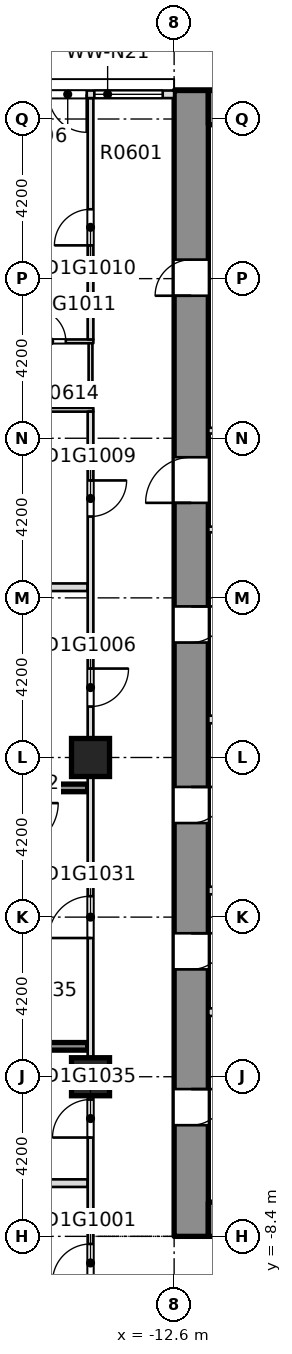
"""IFC4 building model, lengths in metres.
Left out: names, types, materials, properties, quantities, classifications, styles, units other than length and angle.
Written with IfcOpenShell. Run it as: python <this file> out.ifc"""

import sys

from ifc_helpers import new_model, si_unit, direction, frame, frame_2d, origin, origin_2d, place, context, subcontext, project, spatial, rectangle, extrude, element, fill, save


model = new_model("IFC4")
c1 = context("Model", 3, precision=1e-05, world=origin(), true_north=direction((0.0, 1.0)))
c2 = subcontext(c1, "Body", "Model", "MODEL_VIEW")
j1 = project(units=[si_unit("LENGTHUNIT", "METRE"), si_unit("PLANEANGLEUNIT", "RADIAN")], contexts=[c1])
p1 = place(None, origin())
s1 = spatial("IfcSite", under=j1, at=p1, CompositionType="ELEMENT")
p2 = place(p1, origin())
s2 = spatial("IfcBuilding", under=s1, at=p2, CompositionType="ELEMENT")
p3 = place(p2, frame((0.0, 0.0, 34.5)))
s3 = spatial("IfcBuildingStorey", under=s2, at=p3, CompositionType="ELEMENT", Elevation=34.5)
p4 = place(p3, frame((-12.15, -8.4, -0.32), z_axis=(0.0, 0.0, 1.0), x_axis=(0.0, 1.0, 0.0)))
e1 = element("IfcWall", 1, at=p4, inside=s3, PredefinedType="SHEAR", context=c2, shape_type="SweptSolid", body=[
    extrude(rectangle(XDim=30.15, YDim=0.9, at=frame_2d((15.075, 0.0))), origin(), (0.0, 0.0, 1.0), 3.45),
])
p5 = place(p4, frame((2.925, 0.0, 0.32)))
e2 = element("IfcOpeningElement", 2, at=p5, cuts=e1, PredefinedType="OPENING", context=c2, shape_type="SweptSolid", body=[
    extrude(rectangle(XDim=0.95, YDim=2.1, at=frame_2d((0.475, 1.05))), frame((0.0, 0.46, 0.0), z_axis=(0.0, -1.0, 0.0), x_axis=(1.0, 0.0, 0.0)), (0.0, 0.0, 1.0), 0.92),
])
p6 = place(p4, frame((7.025, 0.0, 0.32)))
e3 = element("IfcOpeningElement", 3, at=p6, cuts=e1, PredefinedType="OPENING", context=c2, shape_type="SweptSolid", body=[
    extrude(rectangle(XDim=0.95, YDim=2.1, at=frame_2d((0.475, 1.05))), frame((0.0, 0.46, 0.0), z_axis=(0.0, -1.0, 0.0), x_axis=(1.0, 0.0, 0.0)), (0.0, 0.0, 1.0), 0.92),
])
p7 = place(p4, frame((10.875, 0.0, 0.32)))
e4 = element("IfcOpeningElement", 4, at=p7, cuts=e1, PredefinedType="OPENING", context=c2, shape_type="SweptSolid", body=[
    extrude(rectangle(XDim=0.95, YDim=2.1, at=frame_2d((0.475, 1.05))), frame((0.0, 0.46, 0.0), z_axis=(0.0, -1.0, 0.0), x_axis=(1.0, 0.0, 0.0)), (0.0, 0.0, 1.0), 0.92),
])
p8 = place(p4, frame((15.625, 0.0, 0.32)))
e5 = element("IfcOpeningElement", 5, at=p8, cuts=e1, PredefinedType="OPENING", context=c2, shape_type="SweptSolid", body=[
    extrude(rectangle(XDim=0.95, YDim=2.1, at=frame_2d((0.475, 1.05))), frame((0.0, 0.46, 0.0), z_axis=(0.0, -1.0, 0.0), x_axis=(1.0, 0.0, 0.0)), (0.0, 0.0, 1.0), 0.92),
])
p9 = place(p4, frame((24.75, 0.0, 0.32)))
e6 = element("IfcOpeningElement", 6, at=p9, cuts=e1, PredefinedType="OPENING", context=c2, shape_type="SweptSolid", body=[
    extrude(rectangle(XDim=0.95, YDim=2.1, at=frame_2d((0.475, 1.05))), frame((0.0, 0.46, 0.0), z_axis=(0.0, -1.0, 0.0), x_axis=(1.0, 0.0, 0.0)), (0.0, 0.0, 1.0), 0.92),
])
p10 = place(p4, frame((19.3, 0.0, 0.32)))
e7 = element("IfcOpeningElement", 7, at=p10, cuts=e1, PredefinedType="OPENING", context=c2, shape_type="SweptSolid", body=[
    extrude(rectangle(XDim=1.2, YDim=2.1, at=frame_2d((0.6, 1.05))), frame((0.0, 0.46, 0.0), z_axis=(0.0, -1.0, 0.0), x_axis=(1.0, 0.0, 0.0)), (0.0, 0.0, 1.0), 0.92),
])
p11 = place(p3, frame((-11.7, -7.95, -0.32), z_axis=(0.0, 0.0, 1.0), x_axis=(1.0, 0.0, 0.0)))
e8 = element("IfcWall", 8, at=p11, inside=s3, PredefinedType="SHEAR", context=c2, shape_type="SweptSolid", body=[
    extrude(rectangle(XDim=23.4, YDim=0.9, at=frame_2d((11.7, 0.0))), origin(), (0.0, 0.0, 1.0), 3.45),
])
p12 = place(p11, frame((6.95, 0.0, 0.32)))
e9 = element("IfcOpeningElement", 9, at=p12, cuts=e8, PredefinedType="OPENING", context=c2, shape_type="SweptSolid", body=[
    extrude(rectangle(XDim=1.8, YDim=2.1, at=frame_2d((0.9, 1.05))), frame((0.0, 0.46, 0.0), z_axis=(0.0, -1.0, 0.0), x_axis=(1.0, 0.0, 0.0)), (0.0, 0.0, 1.0), 0.92),
])
p13 = place(p11, frame((14.65, 0.0, 0.32)))
e10 = element("IfcOpeningElement", 10, at=p13, cuts=e8, PredefinedType="OPENING", context=c2, shape_type="SweptSolid", body=[
    extrude(rectangle(XDim=1.8, YDim=2.1, at=frame_2d((0.9, 1.05))), frame((0.0, 0.46, 0.0), z_axis=(0.0, -1.0, 0.0), x_axis=(1.0, 0.0, 0.0)), (0.0, 0.0, 1.0), 0.92),
])
p14 = place(p3, frame((-11.7, 21.3, -0.32), z_axis=(0.0, 0.0, 1.0), x_axis=(1.0, 0.0, 0.0)))
e11 = element("IfcWall", 11, at=p14, inside=s3, PredefinedType="SOLIDWALL", context=c2, shape_type="SweptSolid", body=[
    extrude(rectangle(XDim=23.4, YDim=0.9, at=frame_2d((11.7, 0.0))), origin(), (0.0, 0.0, 1.0), 3.45),
])
for number, where, z_axis, x_axis in (
    (12, (-14.8, -4.2, -0.32), (0.0, 0.0, 1.0), (1.0, 0.0, 0.0)),
    (13, (-14.8, 4.2, -0.32), (0.0, 0.0, 1.0), (1.0, 0.0, 0.0)),
):
    element("IfcColumn", number, at=place(p3, frame(where, z_axis=z_axis, x_axis=x_axis)), inside=s3, PredefinedType="COLUMN", context=c2, shape_type="SweptSolid", body=[
        extrude(rectangle(XDim=1.0, YDim=1.0, at=origin_2d()), origin(), (0.0, 0.0, 1.0), 3.45),
    ])
p15 = place(p3, frame((-25.75, -7.0, 0.0), z_axis=(0.0, 0.0, 1.0), x_axis=(1.0, 0.0, 0.0)))
e14 = element("IfcWall", 14, at=p15, inside=s3, PredefinedType="PARTITIONING", context=c2, shape_type="SweptSolid", body=[
    extrude(rectangle(XDim=10.875, YDim=0.2, at=frame_2d((5.438, 0.0))), origin(), (0.0, 0.0, 1.0), 3.13),
])
p16 = place(p3, frame((-23.0, -3.4, 0.0), z_axis=(0.0, 0.0, 1.0), x_axis=(1.0, 0.0, 0.0)))
e15 = element("IfcWall", 15, at=p16, inside=s3, PredefinedType="SOLIDWALL", context=c2, shape_type="SweptSolid", body=[
    extrude(rectangle(XDim=8.125, YDim=0.2, at=frame_2d((4.062, 0.0))), origin(), (0.0, 0.0, 1.0), 3.13),
])
p17 = place(p3, frame((-20.45, 3.4, 0.0), z_axis=(0.0, 0.0, 1.0), x_axis=(1.0, 0.0, 0.0)))
e16 = element("IfcWall", 16, at=p17, inside=s3, PredefinedType="SOLIDWALL", context=c2, shape_type="SweptSolid", body=[
    extrude(rectangle(XDim=5.575, YDim=0.2, at=frame_2d((2.788, 0.0))), origin(), (0.0, 0.0, 1.0), 3.13),
])
p18 = place(p3, frame((-25.75, 8.68, 0.0), z_axis=(0.0, 0.0, 1.0), x_axis=(1.0, 0.0, 0.0)))
e17 = element("IfcWall", 17, at=p18, inside=s3, PredefinedType="PARTITIONING", context=c2, shape_type="SweptSolid", body=[
    extrude(rectangle(XDim=10.875, YDim=0.2, at=frame_2d((5.438, 0.0))), origin(), (0.0, 0.0, 1.0), 3.13),
])
p19 = place(p3, frame((-17.25, 13.35, 0.0), z_axis=(0.0, 0.0, 1.0), x_axis=(1.0, 0.0, 0.0)))
e18 = element("IfcWall", 18, at=p19, inside=s3, PredefinedType="PARTITIONING", context=c2, shape_type="SweptSolid", body=[
    extrude(rectangle(XDim=2.525, YDim=0.1, at=frame_2d((1.262, 0.0))), origin(), (0.0, 0.0, 1.0), 3.13),
])
p20 = place(p3, frame((-16.45, 15.15, 0.0), z_axis=(0.0, 0.0, 1.0), x_axis=(1.0, 0.0, 0.0)))
e19 = element("IfcWall", 19, at=p20, inside=s3, PredefinedType="PARTITIONING", context=c2, shape_type="SweptSolid", body=[
    extrude(rectangle(XDim=1.725, YDim=0.1, at=frame_2d((0.862, 0.0))), origin(), (0.0, 0.0, 1.0), 3.13),
])
p21 = place(p20, frame((0.15, 0.0, 0.0)))
e20 = element("IfcOpeningElement", 20, at=p21, cuts=e19, PredefinedType="OPENING", context=c2, shape_type="SweptSolid", body=[
    extrude(rectangle(XDim=0.85, YDim=2.1, at=frame_2d((0.425, 1.05))), frame((0.0, 0.06, 0.0), z_axis=(0.0, -1.0, 0.0), x_axis=(1.0, 0.0, 0.0)), (0.0, 0.0, 1.0), 0.12),
])
p22 = place(p3, frame((-14.8, -10.525, 0.0), z_axis=(0.0, 0.0, 1.0), x_axis=(0.0, 1.0, 0.0)))
e21 = element("IfcWall", 21, at=p22, inside=s3, PredefinedType="PARTITIONING", context=c2, shape_type="SweptSolid", body=[
    extrude(rectangle(XDim=23.825, YDim=0.15, at=frame_2d((11.913, 0.0))), origin(), (0.0, 0.0, 1.0), 3.13),
])
p23 = place(p22, frame((0.925, 0.0, 0.0)))
e22 = element("IfcOpeningElement", 22, at=p23, cuts=e21, PredefinedType="OPENING", context=c2, shape_type="SweptSolid", body=[
    extrude(rectangle(XDim=1.0, YDim=2.1, at=frame_2d((0.5, 1.05))), frame((0.0, 0.085, 0.0), z_axis=(0.0, -1.0, 0.0), x_axis=(1.0, 0.0, 0.0)), (0.0, 0.0, 1.0), 0.17),
])
p24 = place(p22, frame((16.065, 0.0, 0.0)))
e23 = element("IfcOpeningElement", 23, at=p24, cuts=e21, PredefinedType="OPENING", context=c2, shape_type="SweptSolid", body=[
    extrude(rectangle(XDim=1.0, YDim=2.1, at=frame_2d((0.5, 1.05))), frame((0.0, 0.085, 0.0), z_axis=(0.0, -1.0, 0.0), x_axis=(1.0, 0.0, 0.0)), (0.0, 0.0, 1.0), 0.17),
])
p25 = place(p22, frame((21.065, 0.0, 0.0)))
e24 = element("IfcOpeningElement", 24, at=p25, cuts=e21, PredefinedType="OPENING", context=c2, shape_type="SweptSolid", body=[
    extrude(rectangle(XDim=0.95, YDim=2.1, at=frame_2d((0.475, 1.05))), frame((0.0, 0.085, 0.0), z_axis=(0.0, -1.0, 0.0), x_axis=(1.0, 0.0, 0.0)), (0.0, 0.0, 1.0), 0.17),
])
p26 = place(p22, frame((9.975, 0.0, 0.0)))
e25 = element("IfcOpeningElement", 25, at=p26, cuts=e21, PredefinedType="OPENING", context=c2, shape_type="SweptSolid", body=[
    extrude(rectangle(XDim=1.1, YDim=2.1, at=frame_2d((0.55, 1.05))), frame((0.0, 0.085, 0.0), z_axis=(0.0, -1.0, 0.0), x_axis=(1.0, 0.0, 0.0)), (0.0, 0.0, 1.0), 0.17),
])
p27 = place(p22, frame((4.725, 0.0, 0.0)))
e26 = element("IfcOpeningElement", 26, at=p27, cuts=e21, PredefinedType="OPENING", context=c2, shape_type="SweptSolid", body=[
    extrude(rectangle(XDim=1.0, YDim=2.1, at=frame_2d((0.5, 1.05))), frame((0.0, 0.085, 0.0), z_axis=(0.0, -1.0, 0.0), x_axis=(1.0, 0.0, 0.0)), (0.0, 0.0, 1.0), 0.17),
])
p28 = place(p3, frame((-14.8, 13.4, 0.0), z_axis=(0.0, 0.0, 1.0), x_axis=(0.0, 1.0, 0.0)))
e27 = element("IfcWall", 27, at=p28, inside=s3, PredefinedType="PARTITIONING", context=c2, shape_type="SweptSolid", body=[
    extrude(rectangle(XDim=1.7, YDim=0.1, at=frame_2d((0.85, 0.0))), origin(), (0.0, 0.0, 1.0), 3.13),
])
p29 = place(p3, frame((-14.8, 15.2, 0.0), z_axis=(0.0, 0.0, 1.0), x_axis=(0.0, 1.0, 0.0)))
e28 = element("IfcWall", 28, at=p29, inside=s3, PredefinedType="PARTITIONING", context=c2, shape_type="SweptSolid", body=[
    extrude(rectangle(XDim=6.35, YDim=0.15, at=frame_2d((3.175, 0.0))), origin(), (0.0, 0.0, 1.0), 3.13),
])
p30 = place(p29, frame((2.475, 0.0, 0.0)))
e29 = element("IfcOpeningElement", 29, at=p30, cuts=e28, PredefinedType="OPENING", context=c2, shape_type="SweptSolid", body=[
    extrude(rectangle(XDim=0.95, YDim=2.1, at=frame_2d((0.475, 1.05))), frame((0.0, 0.085, 0.0), z_axis=(0.0, -1.0, 0.0), x_axis=(1.0, 0.0, 0.0)), (0.0, 0.0, 1.0), 0.17),
])
p31 = place(p3, frame((-12.6, 21.65, 0.0), z_axis=(0.0, 0.0, 1.0), x_axis=(-1.0, 0.0, 0.0)))
e30 = element("IfcWall", 30, at=p31, inside=s3, PredefinedType="STANDARD", context=c2, shape_type="SweptSolid", body=[
    extrude(rectangle(XDim=3.5, YDim=0.2, at=frame_2d((1.75, 0.0))), origin(), (0.0, 0.0, 1.0), 3.13),
])
p32 = place(p31, frame((0.3, 0.0, 0.2)))
e31 = element("IfcOpeningElement", 31, at=p32, cuts=e30, PredefinedType="OPENING", context=c2, shape_type="SweptSolid", body=[
    extrude(rectangle(XDim=1.8, YDim=2.65, at=frame_2d((0.9, 1.325))), frame((0.0, 0.11, 0.0), z_axis=(0.0, -1.0, 0.0), x_axis=(1.0, 0.0, 0.0)), (0.0, 0.0, 1.0), 0.22),
])
p33 = place(p31, frame((2.3, 0.0, 0.0)))
e32 = element("IfcOpeningElement", 32, at=p33, cuts=e30, PredefinedType="OPENING", context=c2, shape_type="SweptSolid", body=[
    extrude(rectangle(XDim=1.0, YDim=2.4, at=frame_2d((0.5, 1.2))), frame((0.0, 0.11, 0.0), z_axis=(0.0, -1.0, 0.0), x_axis=(1.0, 0.0, 0.0)), (0.0, 0.0, 1.0), 0.22),
])
for number, where, z_axis, x_axis in (
    (33, (-11.699, -2.5, 0.0), (0.0, 0.0, 1.0), (1.0, 0.0, 0.0)),
    (34, (-11.699, 0.7, 0.0), (0.0, 0.0, 1.0), (1.0, 0.0, 0.0)),
    (35, (-11.699, 5.2, 0.0), (0.0, 0.0, 1.0), (1.0, 0.0, 0.0)),
):
    element("IfcWall", number, at=place(p3, frame(where, z_axis=z_axis, x_axis=x_axis)), inside=s3, PredefinedType="PARTITIONING", context=c2, shape_type="SweptSolid", body=[
        extrude(rectangle(XDim=2.848, YDim=0.2, at=frame_2d((1.424, 0.0))), origin(), (0.0, 0.0, 1.0), 3.13),
    ])
for number, where, z_axis, x_axis in (
    (36, (-11.699, 10.2, 0.0), (0.0, 0.0, 1.0), (1.0, 0.0, 0.0)),
    (37, (-11.699, 12.8, 0.0), (0.0, 0.0, 1.0), (1.0, 0.0, 0.0)),
):
    element("IfcWall", number, at=place(p3, frame(where, z_axis=z_axis, x_axis=x_axis)), inside=s3, PredefinedType="PARTITIONING", context=c2, shape_type="SweptSolid", body=[
        extrude(rectangle(XDim=2.848, YDim=0.15, at=frame_2d((1.424, 0.0))), origin(), (0.0, 0.0, 1.0), 3.13),
    ])
p34 = place(p23, origin())
e38 = element("IfcDoor", 38, at=p34, inside=s3, OperationType="SINGLE_SWING_LEFT", PredefinedType="DOOR", context=c2, shape_type="SweptSolid", body=[
    extrude(rectangle(XDim=1.0, YDim=2.1, at=frame_2d((0.5, 1.05))), frame((0.0, 0.025, 0.0), z_axis=(0.0, -1.0, 0.0), x_axis=(1.0, 0.0, 0.0)), (0.0, 0.0, 1.0), 0.05),
])
fill(e22, e38)
p35 = place(p24, origin())
e39 = element("IfcDoor", 39, at=p35, inside=s3, OperationType="SINGLE_SWING_LEFT", PredefinedType="DOOR", context=c2, shape_type="SweptSolid", body=[
    extrude(rectangle(XDim=1.0, YDim=2.1, at=frame_2d((0.5, 1.05))), frame((0.0, 0.025, 0.0), z_axis=(0.0, -1.0, 0.0), x_axis=(1.0, 0.0, 0.0)), (0.0, 0.0, 1.0), 0.05),
])
fill(e23, e39)
p36 = place(p25, origin())
e40 = element("IfcDoor", 40, at=p36, inside=s3, OperationType="SINGLE_SWING_RIGHT", PredefinedType="DOOR", context=c2, shape_type="SweptSolid", body=[
    extrude(rectangle(XDim=0.95, YDim=2.1, at=frame_2d((0.475, 1.05))), frame((0.0, 0.025, 0.0), z_axis=(0.0, -1.0, 0.0), x_axis=(1.0, 0.0, 0.0)), (0.0, 0.0, 1.0), 0.05),
])
fill(e24, e40)
p37 = place(p30, origin())
e41 = element("IfcDoor", 41, at=p37, inside=s3, OperationType="SINGLE_SWING_RIGHT", PredefinedType="DOOR", context=c2, shape_type="SweptSolid", body=[
    extrude(rectangle(XDim=0.95, YDim=2.1, at=frame_2d((0.475, 1.05))), frame((0.0, 0.025, 0.0), z_axis=(0.0, -1.0, 0.0), x_axis=(1.0, 0.0, 0.0)), (0.0, 0.0, 1.0), 0.05),
])
fill(e29, e41)
p38 = place(p21, origin())
e42 = element("IfcDoor", 42, at=p38, inside=s3, OperationType="SINGLE_SWING_RIGHT", PredefinedType="DOOR", context=c2, shape_type="SweptSolid", body=[
    extrude(rectangle(XDim=0.85, YDim=2.1, at=frame_2d((0.425, 1.05))), frame((0.0, 0.025, 0.0), z_axis=(0.0, -1.0, 0.0), x_axis=(1.0, 0.0, 0.0)), (0.0, 0.0, 1.0), 0.05),
])
fill(e20, e42)
p39 = place(p26, origin())
e43 = element("IfcDoor", 43, at=p39, inside=s3, OperationType="SINGLE_SWING_RIGHT", PredefinedType="DOOR", context=c2, shape_type="SweptSolid", body=[
    extrude(rectangle(XDim=1.1, YDim=2.1, at=frame_2d((0.55, 1.05))), frame((0.0, 0.025, 0.0), z_axis=(0.0, -1.0, 0.0), x_axis=(1.0, 0.0, 0.0)), (0.0, 0.0, 1.0), 0.05),
])
fill(e25, e43)
p40 = place(p27, origin())
e44 = element("IfcDoor", 44, at=p40, inside=s3, OperationType="SINGLE_SWING_LEFT", PredefinedType="DOOR", context=c2, shape_type="SweptSolid", body=[
    extrude(rectangle(XDim=1.0, YDim=2.1, at=frame_2d((0.5, 1.05))), frame((0.0, 0.025, 0.0), z_axis=(0.0, -1.0, 0.0), x_axis=(1.0, 0.0, 0.0)), (0.0, 0.0, 1.0), 0.05),
])
fill(e26, e44)
p41 = place(p32, origin())
e45 = element("IfcWindow", 45, at=p41, inside=s3, PartitioningType="SINGLE_PANEL", PredefinedType="WINDOW", context=c2, shape_type="SweptSolid", body=[
    extrude(rectangle(XDim=1.8, YDim=2.65, at=frame_2d((0.9, 1.325))), frame((0.0, 0.03, 0.0), z_axis=(0.0, -1.0, 0.0), x_axis=(1.0, 0.0, 0.0)), (0.0, 0.0, 1.0), 0.06),
])
fill(e31, e45)
p42 = place(p33, origin())
e46 = element("IfcDoor", 46, at=p42, inside=s3, OperationType="SINGLE_SWING_LEFT", PredefinedType="DOOR", context=c2, shape_type="SweptSolid", body=[
    extrude(rectangle(XDim=1.0, YDim=2.4, at=frame_2d((0.5, 1.2))), frame((0.0, 0.025, 0.0), z_axis=(0.0, -1.0, 0.0), x_axis=(1.0, 0.0, 0.0)), (0.0, 0.0, 1.0), 0.05),
])
fill(e32, e46)
p43 = place(p5, origin())
e47 = element("IfcDoor", 47, at=p43, inside=s3, OperationType="SINGLE_SWING_LEFT", PredefinedType="DOOR", context=c2, shape_type="SweptSolid", body=[
    extrude(rectangle(XDim=0.95, YDim=2.1, at=frame_2d((0.475, 1.05))), frame((0.0, 0.025, 0.0), z_axis=(0.0, -1.0, 0.0), x_axis=(1.0, 0.0, 0.0)), (0.0, 0.0, 1.0), 0.05),
])
fill(e2, e47)
p44 = place(p6, origin())
e48 = element("IfcDoor", 48, at=p44, inside=s3, OperationType="SINGLE_SWING_LEFT", PredefinedType="DOOR", context=c2, shape_type="SweptSolid", body=[
    extrude(rectangle(XDim=0.95, YDim=2.1, at=frame_2d((0.475, 1.05))), frame((0.0, 0.025, 0.0), z_axis=(0.0, -1.0, 0.0), x_axis=(1.0, 0.0, 0.0)), (0.0, 0.0, 1.0), 0.05),
])
fill(e3, e48)
p45 = place(p7, origin())
e49 = element("IfcDoor", 49, at=p45, inside=s3, OperationType="SINGLE_SWING_LEFT", PredefinedType="DOOR", context=c2, shape_type="SweptSolid", body=[
    extrude(rectangle(XDim=0.95, YDim=2.1, at=frame_2d((0.475, 1.05))), frame((0.0, 0.025, 0.0), z_axis=(0.0, -1.0, 0.0), x_axis=(1.0, 0.0, 0.0)), (0.0, 0.0, 1.0), 0.05),
])
fill(e4, e49)
p46 = place(p8, origin())
e50 = element("IfcDoor", 50, at=p46, inside=s3, OperationType="SINGLE_SWING_LEFT", PredefinedType="DOOR", context=c2, shape_type="SweptSolid", body=[
    extrude(rectangle(XDim=0.95, YDim=2.1, at=frame_2d((0.475, 1.05))), frame((0.0, 0.025, 0.0), z_axis=(0.0, -1.0, 0.0), x_axis=(1.0, 0.0, 0.0)), (0.0, 0.0, 1.0), 0.05),
])
fill(e5, e50)
p47 = place(p9, origin())
e51 = element("IfcDoor", 51, at=p47, inside=s3, OperationType="SINGLE_SWING_LEFT", PredefinedType="DOOR", context=c2, shape_type="SweptSolid", body=[
    extrude(rectangle(XDim=0.95, YDim=2.1, at=frame_2d((0.475, 1.05))), frame((0.0, 0.025, 0.0), z_axis=(0.0, -1.0, 0.0), x_axis=(1.0, 0.0, 0.0)), (0.0, 0.0, 1.0), 0.05),
])
fill(e6, e51)
p48 = place(p10, origin())
e52 = element("IfcDoor", 52, at=p48, inside=s3, OperationType="SINGLE_SWING_LEFT", PredefinedType="DOOR", context=c2, shape_type="SweptSolid", body=[
    extrude(rectangle(XDim=1.2, YDim=2.1, at=frame_2d((0.6, 1.05))), frame((0.0, 0.025, 0.0), z_axis=(0.0, -1.0, 0.0), x_axis=(1.0, 0.0, 0.0)), (0.0, 0.0, 1.0), 0.05),
])
fill(e7, e52)
save(model, sys.argv[1])
